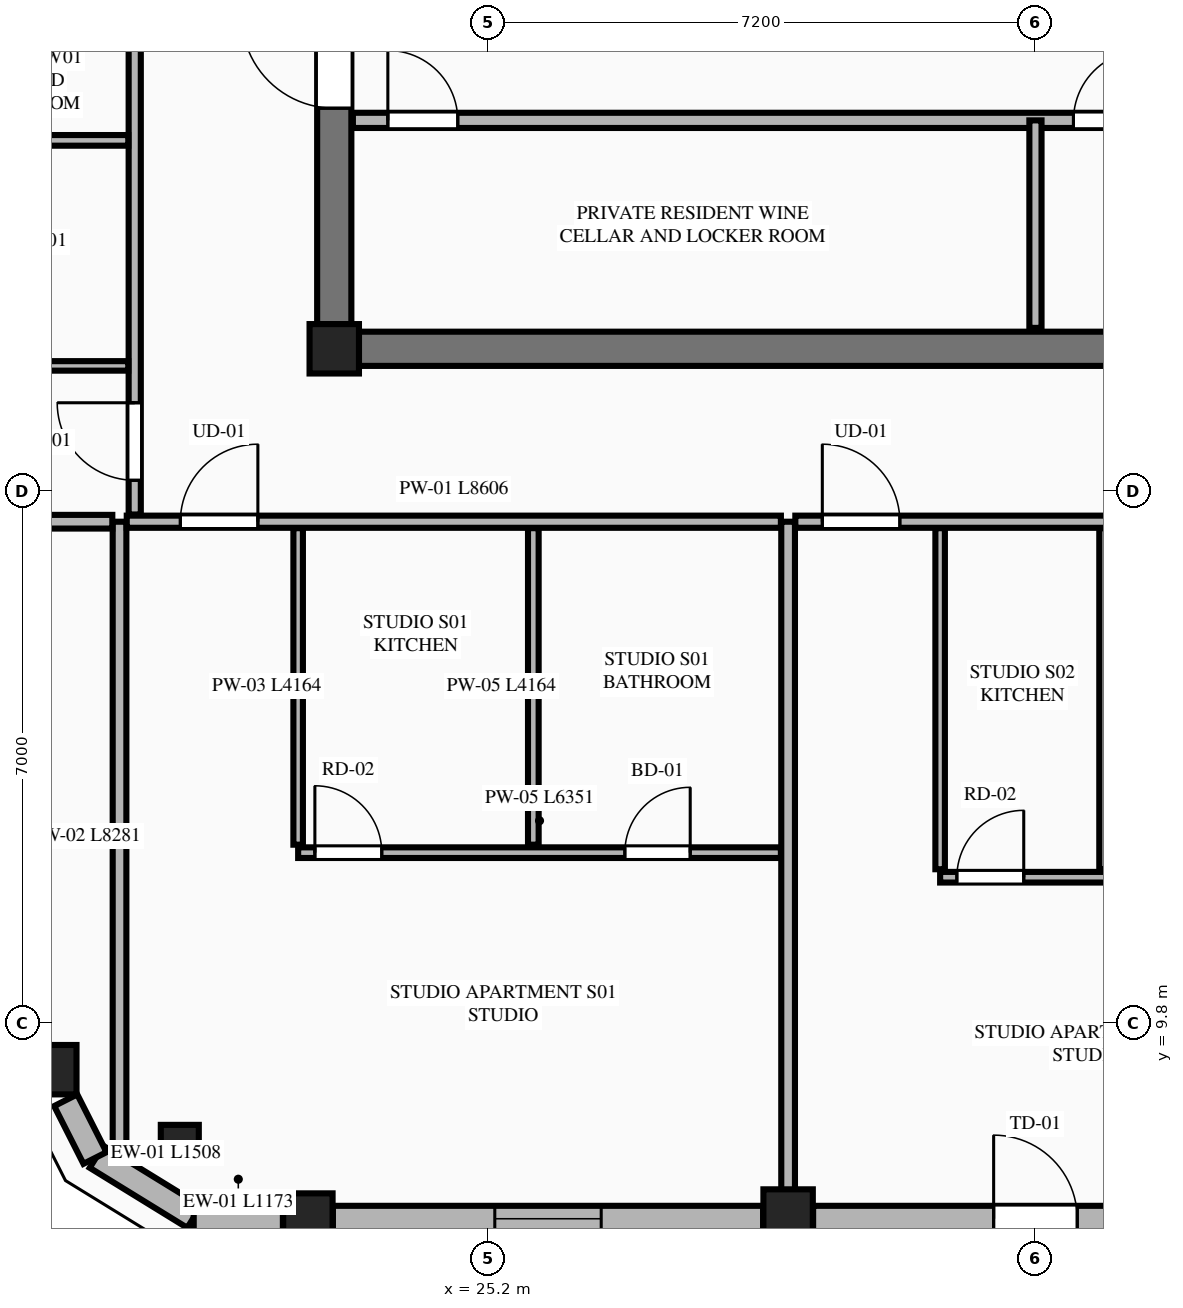
"""IFC4 building model, lengths in metres.
Left out: names, types, materials, properties, quantities, classifications, styles, units other than length and angle.
Written with IfcOpenShell. Run it as: python <this file> out.ifc"""

import sys

from ifc_helpers import new_model, si_unit, direction, frame, frame_2d, origin, origin_2d, place, context, subcontext, project, spatial, rectangle, extrude, element, fill, save


model = new_model("IFC4")
c1 = context("Model", 3, precision=1e-05, world=origin(), true_north=direction((0.0, 1.0)))
c2 = subcontext(c1, "Body", "Model", "MODEL_VIEW")
j1 = project(units=[si_unit("LENGTHUNIT", "METRE"), si_unit("PLANEANGLEUNIT", "RADIAN")], contexts=[c1])
p1 = place(None, origin())
s1 = spatial("IfcSite", under=j1, at=p1, CompositionType="ELEMENT")
p2 = place(p1, origin())
s2 = spatial("IfcBuilding", under=s1, at=p2, CompositionType="ELEMENT")
p3 = place(p2, frame((0.0, 0.0, 270.8)))
s3 = spatial("IfcBuildingStorey", under=s2, at=p3, CompositionType="ELEMENT", Elevation=270.8)
p4 = place(p3, frame((23.175, 18.675, 0.0), z_axis=(0.0, 0.0, 1.0), x_axis=(1.0, 0.0, 0.0)))
e1 = element("IfcColumn", 1, at=p4, inside=s3, PredefinedType="COLUMN", context=c2, shape_type="SweptSolid", body=[
    extrude(rectangle(XDim=0.65, YDim=0.65, at=origin_2d()), origin(), (0.0, 0.0, 1.0), 3.65),
])
p5 = place(p3, frame((23.5, 18.675, 0.0), z_axis=(0.0, 0.0, 1.0), x_axis=(1.0, 0.0, 0.0)))
e2 = element("IfcWall", 2, at=p5, inside=s3, PredefinedType="SHEAR", context=c2, shape_type="SweptSolid", body=[
    extrude(rectangle(XDim=17.8, YDim=0.45, at=frame_2d((8.9, 0.0))), origin(), (0.0, 0.0, 1.0), 3.45),
])
p6 = place(p3, frame((23.175, 19.0, 0.0), z_axis=(0.0, 0.0, 1.0), x_axis=(0.0, 1.0, 0.0)))
e3 = element("IfcWall", 3, at=p6, inside=s3, PredefinedType="SHEAR", context=c2, shape_type="SweptSolid", body=[
    extrude(rectangle(XDim=13.8, YDim=0.45, at=frame_2d((6.9, 0.0))), origin(), (0.0, 0.0, 1.0), 3.45),
])
p7 = place(p6, frame((2.84, 0.0, 0.0)))
e4 = element("IfcOpeningElement", 4, at=p7, cuts=e3, PredefinedType="OPENING", context=c2, shape_type="SweptSolid", body=[
    extrude(rectangle(XDim=1.22, YDim=2.25, at=frame_2d((0.61, 1.125))), frame((0.0, 0.235, 0.0), z_axis=(0.0, -1.0, 0.0), x_axis=(1.0, 0.0, 0.0)), (0.0, 0.0, 1.0), 0.47),
])
for number, where, z_axis, x_axis in (
    (5, (22.828, 7.239, 0.0), (0.0, 0.0, 1.0), (1.0, 0.0, 0.0)),
    (6, (29.146, 7.292, 0.0), (0.0, 0.0, 1.0), (1.0, 0.0, 0.0)),
    (7, (19.459, 9.191, 0.0), (0.0, 0.0, 1.0), (1.0, 0.0, 0.0)),
):
    element("IfcColumn", number, at=place(p3, frame(where, z_axis=z_axis, x_axis=x_axis)), inside=s3, PredefinedType="COLUMN", context=c2, shape_type="SweptSolid", body=[
        extrude(rectangle(XDim=0.65, YDim=0.65, at=origin_2d()), origin(), (0.0, 0.0, 1.0), 3.65),
    ])
p8 = place(p3, frame((21.143, 8.215, 0.0), z_axis=(0.0, 0.0, 1.0), x_axis=(0.865256437757, -0.501329529272, 0.0)))
e8 = element("IfcColumn", 8, at=p8, inside=s3, PredefinedType="PILASTER", context=c2, shape_type="SweptSolid", body=[
    extrude(rectangle(XDim=0.5, YDim=0.35, at=origin_2d()), origin(), (0.0, 0.0, 1.0), 3.65),
])
p9 = place(p3, frame((23.42, 21.68, 0.0), z_axis=(0.0, 0.0, 1.0), x_axis=(1.0, 0.0, 0.0)))
e9 = element("IfcWall", 9, at=p9, inside=s3, PredefinedType="PLUMBINGWALL", context=c2, shape_type="SweptSolid", body=[
    extrude(rectangle(XDim=17.96, YDim=0.2, at=frame_2d((8.98, 0.0))), origin(), (0.0, 0.0, 1.0), 3.45),
])
p10 = place(p9, frame((0.46, 0.0, 0.0)))
e10 = element("IfcOpeningElement", 10, at=p10, cuts=e9, PredefinedType="OPENING", context=c2, shape_type="SweptSolid", body=[
    extrude(rectangle(XDim=0.92, YDim=2.15, at=frame_2d((0.46, 1.075))), frame((0.0, 0.11, 0.0), z_axis=(0.0, -1.0, 0.0), x_axis=(1.0, 0.0, 0.0)), (0.0, 0.0, 1.0), 0.22),
])
p11 = place(p9, frame((9.48, 0.0, 0.0)))
e11 = element("IfcOpeningElement", 11, at=p11, cuts=e9, PredefinedType="OPENING", context=c2, shape_type="SweptSolid", body=[
    extrude(rectangle(XDim=0.92, YDim=2.15, at=frame_2d((0.46, 1.075))), frame((0.0, 0.11, 0.0), z_axis=(0.0, -1.0, 0.0), x_axis=(1.0, 0.0, 0.0)), (0.0, 0.0, 1.0), 0.22),
])
p12 = place(p3, frame((32.4, 18.95, 0.0), z_axis=(0.0, 0.0, 1.0), x_axis=(0.0, 1.0, 0.0)))
e12 = element("IfcWall", 12, at=p12, inside=s3, PredefinedType="PARTITIONING", context=c2, shape_type="SweptSolid", body=[
    extrude(rectangle(XDim=2.73, YDim=0.16, at=frame_2d((1.365, 0.0))), origin(), (0.0, 0.0, 1.0), 3.45),
])
p13 = place(p3, frame((20.047, 8.045, 0.0), z_axis=(0.0, 0.0, 1.0), x_axis=(0.851680557619, -0.52406128246, 0.0)))
e13 = element("IfcWall", 13, at=p13, inside=s3, PredefinedType="STANDARD", context=c2, shape_type="SweptSolid", body=[
    extrude(rectangle(XDim=1.508, YDim=0.34, at=frame_2d((0.754, 0.0))), origin(), (0.0, 0.0, 1.0), 3.45),
])
p14 = place(p3, frame((21.326, 7.23, 0.0), z_axis=(0.0, 0.0, 1.0), x_axis=(1.0, 0.0, 0.0)))
e14 = element("IfcWall", 14, at=p14, inside=s3, PredefinedType="STANDARD", context=c2, shape_type="SweptSolid", body=[
    extrude(rectangle(XDim=1.173, YDim=0.34, at=frame_2d((0.586, 0.0))), origin(), (0.0, 0.0, 1.0), 3.45),
])
p15 = place(p3, frame((23.157, 7.23, 0.0), z_axis=(0.0, 0.0, 1.0), x_axis=(1.0, 0.0, 0.0)))
e15 = element("IfcWall", 15, at=p15, inside=s3, PredefinedType="STANDARD", context=c2, shape_type="SweptSolid", body=[
    extrude(rectangle(XDim=5.66, YDim=0.34, at=frame_2d((2.83, 0.0))), origin(), (0.0, 0.0, 1.0), 2.983),
])
p16 = place(p15, frame((2.13, 0.0, 0.75)))
e16 = element("IfcOpeningElement", 16, at=p16, cuts=e15, PredefinedType="OPENING", context=c2, shape_type="SweptSolid", body=[
    extrude(rectangle(XDim=1.4, YDim=2.05, at=frame_2d((0.7, 1.025))), frame((0.0, 0.18, 0.0), z_axis=(0.0, -1.0, 0.0), x_axis=(1.0, 0.0, 0.0)), (0.0, 0.0, 1.0), 0.36),
])
p17 = place(p3, frame((29.475, 7.23, 0.0), z_axis=(0.0, 0.0, 1.0), x_axis=(1.0, 0.0, 0.0)))
e17 = element("IfcWall", 17, at=p17, inside=s3, PredefinedType="STANDARD", context=c2, shape_type="SweptSolid", body=[
    extrude(rectangle(XDim=5.85, YDim=0.34, at=frame_2d((2.925, 0.0))), origin(), (0.0, 0.0, 1.0), 2.983),
])
p18 = place(p17, frame((2.375, 0.0, 0.0)))
e18 = element("IfcOpeningElement", 18, at=p18, cuts=e17, PredefinedType="OPENING", context=c2, shape_type="SweptSolid", body=[
    extrude(rectangle(XDim=1.1, YDim=2.25, at=frame_2d((0.55, 1.125))), frame((0.0, 0.18, 0.0), z_axis=(0.0, -1.0, 0.0), x_axis=(1.0, 0.0, 0.0)), (0.0, 0.0, 1.0), 0.36),
])
p19 = place(p3, frame((19.642, 8.789, 0.0), z_axis=(0.0, 0.0, 1.0), x_axis=(0.451907025977, -0.8920650424, 0.0)))
e19 = element("IfcWall", 19, at=p19, inside=s3, PredefinedType="STANDARD", context=c2, shape_type="SweptSolid", body=[
    extrude(rectangle(XDim=0.852, YDim=0.34, at=frame_2d((0.426, 0.0))), origin(), (0.0, 0.0, 1.0), 3.45),
])
p20 = place(p3, frame((20.35, 8.119, 0.0), z_axis=(0.0, 0.0, 1.0), x_axis=(0.0, 1.0, 0.0)))
e20 = element("IfcWall", 20, at=p20, inside=s3, PredefinedType="PARTITIONING", context=c2, shape_type="SweptSolid", body=[
    extrude(rectangle(XDim=8.281, YDim=0.18, at=frame_2d((4.141, 0.0))), origin(), (0.0, 0.0, 1.0), 3.45),
])
p21 = place(p3, frame((29.146, 7.405, 0.0), z_axis=(0.0, 0.0, 1.0), x_axis=(0.0, 1.0, 0.0)))
e21 = element("IfcWall", 21, at=p21, inside=s3, PredefinedType="PARTITIONING", context=c2, shape_type="SweptSolid", body=[
    extrude(rectangle(XDim=8.995, YDim=0.18, at=frame_2d((4.498, 0.0))), origin(), (0.0, 0.0, 1.0), 2.907),
])
p22 = place(p3, frame((20.445, 16.4, 0.0), z_axis=(0.0, 0.0, 1.0), x_axis=(1.0, 0.0, 0.0)))
e22 = element("IfcWall", 22, at=p22, inside=s3, PredefinedType="PARTITIONING", context=c2, shape_type="SweptSolid", body=[
    extrude(rectangle(XDim=8.606, YDim=0.16, at=frame_2d((4.303, 0.0))), origin(), (0.0, 0.0, 1.0), 3.45),
])
p23 = place(p22, frame((0.705, 0.0, 0.0)))
e23 = element("IfcOpeningElement", 23, at=p23, cuts=e22, PredefinedType="OPENING", context=c2, shape_type="SweptSolid", body=[
    extrude(rectangle(XDim=1.02, YDim=2.25, at=frame_2d((0.51, 1.125))), frame((0.0, 0.09, 0.0), z_axis=(0.0, -1.0, 0.0), x_axis=(1.0, 0.0, 0.0)), (0.0, 0.0, 1.0), 0.18),
])
p24 = place(p3, frame((22.7, 12.151, 0.0), z_axis=(0.0, 0.0, 1.0), x_axis=(0.0, 1.0, 0.0)))
e24 = element("IfcWall", 24, at=p24, inside=s3, PredefinedType="PARTITIONING", context=c2, shape_type="SweptSolid", body=[
    extrude(rectangle(XDim=4.164, YDim=0.125, at=frame_2d((2.082, 0.0))), origin(), (0.0, 0.0, 1.0), 2.907),
])
p25 = place(p3, frame((22.7, 12.046, 0.0), z_axis=(0.0, 0.0, 1.0), x_axis=(1.0, 0.0, 0.0)))
e25 = element("IfcWall", 25, at=p25, inside=s3, PredefinedType="PLUMBINGWALL", context=c2, shape_type="SweptSolid", body=[
    extrude(rectangle(XDim=6.351, YDim=0.14, at=frame_2d((3.176, 0.0))), origin(), (0.0, 0.0, 1.0), 3.45),
])
p26 = place(p25, frame((4.298, 0.0, 0.0)))
e26 = element("IfcOpeningElement", 26, at=p26, cuts=e25, PredefinedType="OPENING", context=c2, shape_type="SweptSolid", body=[
    extrude(rectangle(XDim=0.86, YDim=2.1, at=frame_2d((0.43, 1.05))), frame((0.0, 0.08, 0.0), z_axis=(0.0, -1.0, 0.0), x_axis=(1.0, 0.0, 0.0)), (0.0, 0.0, 1.0), 0.16),
])
p27 = place(p25, frame((0.22, 0.0, 0.0)))
e27 = element("IfcOpeningElement", 27, at=p27, cuts=e25, PredefinedType="OPENING", context=c2, shape_type="SweptSolid", body=[
    extrude(rectangle(XDim=0.88, YDim=2.15, at=frame_2d((0.44, 1.075))), frame((0.0, 0.08, 0.0), z_axis=(0.0, -1.0, 0.0), x_axis=(1.0, 0.0, 0.0)), (0.0, 0.0, 1.0), 0.16),
])
p28 = place(p3, frame((25.794, 12.151, 0.0), z_axis=(0.0, 0.0, 1.0), x_axis=(0.0, 1.0, 0.0)))
e28 = element("IfcWall", 28, at=p28, inside=s3, PredefinedType="PLUMBINGWALL", context=c2, shape_type="SweptSolid", body=[
    extrude(rectangle(XDim=4.164, YDim=0.14, at=frame_2d((2.082, 0.0))), origin(), (0.0, 0.0, 1.0), 3.45),
])
p29 = place(p3, frame((29.241, 16.4, 0.0), z_axis=(0.0, 0.0, 1.0), x_axis=(1.0, 0.0, 0.0)))
e29 = element("IfcWall", 29, at=p29, inside=s3, PredefinedType="PARTITIONING", context=c2, shape_type="SweptSolid", body=[
    extrude(rectangle(XDim=6.318, YDim=0.16, at=frame_2d((3.159, 0.0))), origin(), (0.0, 0.0, 1.0), 3.45),
])
p30 = place(p29, frame((0.355, 0.0, 0.0)))
e30 = element("IfcOpeningElement", 30, at=p30, cuts=e29, PredefinedType="OPENING", context=c2, shape_type="SweptSolid", body=[
    extrude(rectangle(XDim=1.02, YDim=2.25, at=frame_2d((0.51, 1.125))), frame((0.0, 0.09, 0.0), z_axis=(0.0, -1.0, 0.0), x_axis=(1.0, 0.0, 0.0)), (0.0, 0.0, 1.0), 0.18),
])
p31 = place(p3, frame((31.146, 11.828, 0.0), z_axis=(0.0, 0.0, 1.0), x_axis=(0.0, 1.0, 0.0)))
e31 = element("IfcWall", 31, at=p31, inside=s3, PredefinedType="PARTITIONING", context=c2, shape_type="SweptSolid", body=[
    extrude(rectangle(XDim=4.487, YDim=0.125, at=frame_2d((2.244, 0.0))), origin(), (0.0, 0.0, 1.0), 3.45),
])
p32 = place(p3, frame((31.146, 11.723, 0.0), z_axis=(0.0, 0.0, 1.0), x_axis=(1.0, 0.0, 0.0)))
e32 = element("IfcWall", 32, at=p32, inside=s3, PredefinedType="PLUMBINGWALL", context=c2, shape_type="SweptSolid", body=[
    extrude(rectangle(XDim=4.413, YDim=0.14, at=frame_2d((2.207, 0.0))), origin(), (0.0, 0.0, 1.0), 3.45),
])
p33 = place(p32, frame((2.864, 0.0, 0.0)))
e33 = element("IfcOpeningElement", 33, at=p33, cuts=e32, PredefinedType="OPENING", context=c2, shape_type="SweptSolid", body=[
    extrude(rectangle(XDim=0.86, YDim=2.1, at=frame_2d((0.43, 1.05))), frame((0.0, 0.08, 0.0), z_axis=(0.0, -1.0, 0.0), x_axis=(1.0, 0.0, 0.0)), (0.0, 0.0, 1.0), 0.16),
])
p34 = place(p32, frame((0.22, 0.0, 0.0)))
e34 = element("IfcOpeningElement", 34, at=p34, cuts=e32, PredefinedType="OPENING", context=c2, shape_type="SweptSolid", body=[
    extrude(rectangle(XDim=0.88, YDim=2.15, at=frame_2d((0.44, 1.075))), frame((0.0, 0.08, 0.0), z_axis=(0.0, -1.0, 0.0), x_axis=(1.0, 0.0, 0.0)), (0.0, 0.0, 1.0), 0.16),
])
p35 = place(p3, frame((33.31, 11.828, 0.0), z_axis=(0.0, 0.0, 1.0), x_axis=(0.0, 1.0, 0.0)))
e35 = element("IfcWall", 35, at=p35, inside=s3, PredefinedType="PLUMBINGWALL", context=c2, shape_type="SweptSolid", body=[
    extrude(rectangle(XDim=4.487, YDim=0.14, at=frame_2d((2.244, 0.0))), origin(), (0.0, 0.0, 1.0), 3.45),
])
p36 = place(p3, frame((16.034, 16.4, 0.0), z_axis=(0.0, 0.0, 1.0), x_axis=(1.0, 0.0, 0.0)))
e36 = element("IfcWall", 36, at=p36, inside=s3, PredefinedType="PARTITIONING", context=c2, shape_type="SweptSolid", body=[
    extrude(rectangle(XDim=4.221, YDim=0.18, at=frame_2d((2.11, 0.0))), origin(), (0.0, 0.0, 1.0), 3.45),
])
p37 = place(p3, frame((20.55, 16.495, 0.0), z_axis=(0.0, 0.0, 1.0), x_axis=(0.0, 1.0, 0.0)))
e37 = element("IfcWall", 37, at=p37, inside=s3, PredefinedType="PARTITIONING", context=c2, shape_type="SweptSolid", body=[
    extrude(rectangle(XDim=18.41, YDim=0.16, at=frame_2d((9.205, 0.0))), origin(), (0.0, 0.0, 1.0), 3.137),
])
p38 = place(p37, frame((0.45, 0.0, 0.0)))
e38 = element("IfcOpeningElement", 38, at=p38, cuts=e37, PredefinedType="OPENING", context=c2, shape_type="SweptSolid", body=[
    extrude(rectangle(XDim=1.02, YDim=2.25, at=frame_2d((0.51, 1.125))), frame((0.0, 0.09, 0.0), z_axis=(0.0, -1.0, 0.0), x_axis=(1.0, 0.0, 0.0)), (0.0, 0.0, 1.0), 0.18),
])
p39 = place(p3, frame((16.785, 18.45, 0.0), z_axis=(0.0, 0.0, 1.0), x_axis=(1.0, 0.0, 0.0)))
e39 = element("IfcWall", 39, at=p39, inside=s3, PredefinedType="PARTITIONING", context=c2, shape_type="SweptSolid", body=[
    extrude(rectangle(XDim=3.68, YDim=0.125, at=frame_2d((1.84, 0.0))), origin(), (0.0, 0.0, 1.0), 3.45),
])
p40 = place(p3, frame((16.785, 21.417, 0.0), z_axis=(0.0, 0.0, 1.0), x_axis=(1.0, 0.0, 0.0)))
e40 = element("IfcWall", 40, at=p40, inside=s3, PredefinedType="PLUMBINGWALL", context=c2, shape_type="SweptSolid", body=[
    extrude(rectangle(XDim=3.68, YDim=0.14, at=frame_2d((1.84, 0.0))), origin(), (0.0, 0.0, 1.0), 3.45),
])
p41 = place(p7, origin())
e41 = element("IfcDoor", 41, at=p41, inside=s3, OperationType="SINGLE_SWING_RIGHT", PredefinedType="DOOR", context=c2, shape_type="SweptSolid", body=[
    extrude(rectangle(XDim=1.22, YDim=2.25, at=frame_2d((0.61, 1.125))), frame((0.0, 0.025, 0.0), z_axis=(0.0, -1.0, 0.0), x_axis=(1.0, 0.0, 0.0)), (0.0, 0.0, 1.0), 0.05),
])
fill(e4, e41)
p42 = place(p10, origin())
e42 = element("IfcDoor", 42, at=p42, inside=s3, OperationType="SINGLE_SWING_LEFT", PredefinedType="DOOR", context=c2, shape_type="SweptSolid", body=[
    extrude(rectangle(XDim=0.92, YDim=2.15, at=frame_2d((0.46, 1.075))), frame((0.0, 0.025, 0.0), z_axis=(0.0, -1.0, 0.0), x_axis=(1.0, 0.0, 0.0)), (0.0, 0.0, 1.0), 0.05),
])
fill(e10, e42)
p43 = place(p11, origin())
e43 = element("IfcDoor", 43, at=p43, inside=s3, OperationType="SINGLE_SWING_RIGHT", PredefinedType="DOOR", context=c2, shape_type="SweptSolid", body=[
    extrude(rectangle(XDim=0.92, YDim=2.15, at=frame_2d((0.46, 1.075))), frame((0.0, 0.025, 0.0), z_axis=(0.0, -1.0, 0.0), x_axis=(1.0, 0.0, 0.0)), (0.0, 0.0, 1.0), 0.05),
])
fill(e11, e43)
p44 = place(p16, origin())
e44 = element("IfcWindow", 44, at=p44, inside=s3, PartitioningType="SINGLE_PANEL", PredefinedType="WINDOW", context=c2, shape_type="SweptSolid", body=[
    extrude(rectangle(XDim=1.4, YDim=2.05, at=frame_2d((0.7, 1.025))), frame((0.0, 0.03, 0.0), z_axis=(0.0, -1.0, 0.0), x_axis=(1.0, 0.0, 0.0)), (0.0, 0.0, 1.0), 0.06),
])
fill(e16, e44)
p45 = place(p18, origin())
e45 = element("IfcDoor", 45, at=p45, inside=s3, OperationType="SINGLE_SWING_LEFT", PredefinedType="DOOR", context=c2, shape_type="SweptSolid", body=[
    extrude(rectangle(XDim=1.1, YDim=2.25, at=frame_2d((0.55, 1.125))), frame((0.0, 0.025, 0.0), z_axis=(0.0, -1.0, 0.0), x_axis=(1.0, 0.0, 0.0)), (0.0, 0.0, 1.0), 0.05),
])
fill(e18, e45)
p46 = place(p26, origin())
e46 = element("IfcDoor", 46, at=p46, inside=s3, OperationType="SINGLE_SWING_RIGHT", PredefinedType="DOOR", context=c2, shape_type="SweptSolid", body=[
    extrude(rectangle(XDim=0.86, YDim=2.1, at=frame_2d((0.43, 1.05))), frame((0.0, 0.025, 0.0), z_axis=(0.0, -1.0, 0.0), x_axis=(1.0, 0.0, 0.0)), (0.0, 0.0, 1.0), 0.05),
])
fill(e26, e46)
p47 = place(p23, origin())
e47 = element("IfcDoor", 47, at=p47, inside=s3, OperationType="SINGLE_SWING_RIGHT", PredefinedType="DOOR", context=c2, shape_type="SweptSolid", body=[
    extrude(rectangle(XDim=1.02, YDim=2.25, at=frame_2d((0.51, 1.125))), frame((0.0, 0.025, 0.0), z_axis=(0.0, -1.0, 0.0), x_axis=(1.0, 0.0, 0.0)), (0.0, 0.0, 1.0), 0.05),
])
fill(e23, e47)
p48 = place(p27, origin())
e48 = element("IfcDoor", 48, at=p48, inside=s3, OperationType="SINGLE_SWING_LEFT", PredefinedType="DOOR", context=c2, shape_type="SweptSolid", body=[
    extrude(rectangle(XDim=0.88, YDim=2.15, at=frame_2d((0.44, 1.075))), frame((0.0, 0.025, 0.0), z_axis=(0.0, -1.0, 0.0), x_axis=(1.0, 0.0, 0.0)), (0.0, 0.0, 1.0), 0.05),
])
fill(e27, e48)
p49 = place(p30, origin())
e49 = element("IfcDoor", 49, at=p49, inside=s3, OperationType="SINGLE_SWING_LEFT", PredefinedType="DOOR", context=c2, shape_type="SweptSolid", body=[
    extrude(rectangle(XDim=1.02, YDim=2.25, at=frame_2d((0.51, 1.125))), frame((0.0, 0.025, 0.0), z_axis=(0.0, -1.0, 0.0), x_axis=(1.0, 0.0, 0.0)), (0.0, 0.0, 1.0), 0.05),
])
fill(e30, e49)
p50 = place(p34, origin())
e50 = element("IfcDoor", 50, at=p50, inside=s3, OperationType="SINGLE_SWING_RIGHT", PredefinedType="DOOR", context=c2, shape_type="SweptSolid", body=[
    extrude(rectangle(XDim=0.88, YDim=2.15, at=frame_2d((0.44, 1.075))), frame((0.0, 0.025, 0.0), z_axis=(0.0, -1.0, 0.0), x_axis=(1.0, 0.0, 0.0)), (0.0, 0.0, 1.0), 0.05),
])
fill(e34, e50)
p51 = place(p38, origin())
e51 = element("IfcDoor", 51, at=p51, inside=s3, OperationType="SINGLE_SWING_RIGHT", PredefinedType="DOOR", context=c2, shape_type="SweptSolid", body=[
    extrude(rectangle(XDim=1.02, YDim=2.25, at=frame_2d((0.51, 1.125))), frame((0.0, 0.025, 0.0), z_axis=(0.0, -1.0, 0.0), x_axis=(1.0, 0.0, 0.0)), (0.0, 0.0, 1.0), 0.05),
])
fill(e38, e51)
save(model, sys.argv[1])
